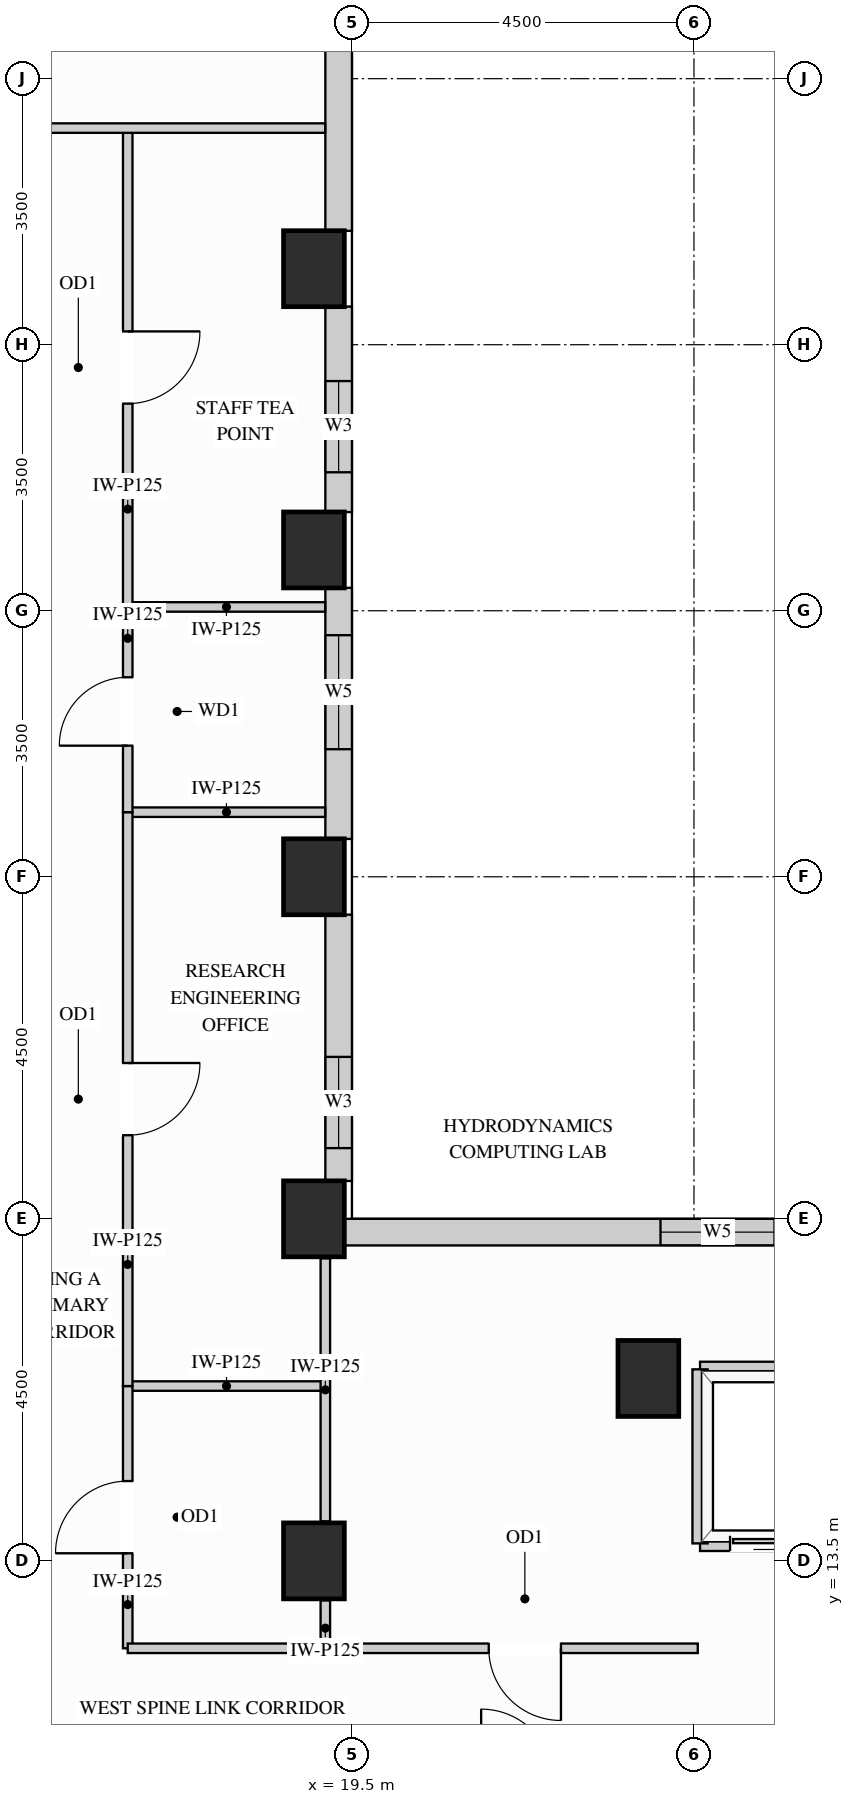
"""IFC4 building model, lengths in metres.
Left out: names, types, materials, properties, quantities, classifications, styles, units other than length and angle.
Written with IfcOpenShell. Run it as: python <this file> out.ifc"""

import sys

from ifc_helpers import new_model, si_unit, direction, frame, frame_2d, origin, origin_2d, place, context, subcontext, project, spatial, rectangle, extrude, source, transform, mapped, element, fill, save


model = new_model("IFC4")
c1 = context("Model", 3, precision=1e-05, world=origin(), true_north=direction((0.0, 1.0)))
c2 = subcontext(c1, "Body", "Model", "MODEL_VIEW")
j1 = project(units=[si_unit("LENGTHUNIT", "METRE"), si_unit("PLANEANGLEUNIT", "RADIAN")], contexts=[c1])
p1 = place(None, origin())
s1 = spatial("IfcSite", under=j1, at=p1, CompositionType="ELEMENT")
p2 = place(p1, origin())
s2 = spatial("IfcBuilding", under=s1, at=p2, CompositionType="ELEMENT")
p3 = place(p2, frame((0.0, 0.0, 186.3)))
s3 = spatial("IfcBuildingStorey", under=s2, at=p3, CompositionType="ELEMENT", Elevation=186.3)
m1 = source(origin(), c2, "Body", "SweptSolid", [
    extrude(rectangle(XDim=0.8, YDim=1.0, at=origin_2d()), origin(), (0.0, 0.0, 1.0), 3.4),
])
for number, where, z_axis, x_axis in (
    (1, (19.0, 13.5, 0.0), (0.0, 0.0, 1.0), (1.0, 0.0, 0.0)),
    (2, (19.0, 18.0, 0.0), (0.0, 0.0, 1.0), (1.0, 0.0, 0.0)),
    (3, (19.0, 22.5, 0.0), (0.0, 0.0, 1.0), (1.0, 0.0, 0.0)),
    (4, (19.0, 26.8, 0.0), (0.0, 0.0, 1.0), (1.0, 0.0, 0.0)),
    (5, (19.0, 30.5, 0.0), (0.0, 0.0, 1.0), (1.0, 0.0, 0.0)),
    (6, (23.4, 15.9, 0.0), (0.0, 0.0, 1.0), (1.0, 0.0, 0.0)),
):
    element("IfcColumn", number, at=place(p3, frame(where, z_axis=z_axis, x_axis=x_axis)), inside=s3, PredefinedType="COLUMN", context=c2, shape_type="MappedRepresentation", body=[
        mapped(m1, transform((0.0, 0.0, 0.0), x_axis=(1.0, 0.0, 0.0), y_axis=(0.0, 1.0, 0.0), z_axis=(0.0, 0.0, 1.0))),
    ])
p4 = place(p3, frame((34.502, 17.825, 0.0), z_axis=(0.0, 0.0, 1.0), x_axis=(-1.0, 0.0, 0.0)))
e7 = element("IfcWall", 7, at=p4, inside=s3, PredefinedType="SOLIDWALL", context=c2, shape_type="SweptSolid", body=[
    extrude(rectangle(XDim=15.104, YDim=0.35, at=frame_2d((7.552, 0.0))), origin(), (0.0, 0.0, 1.0), 3.385),
])
p5 = place(p4, frame((4.131, 0.0, 0.78)))
e8 = element("IfcOpeningElement", 8, at=p5, cuts=e7, PredefinedType="OPENING", context=c2, shape_type="SweptSolid", body=[
    extrude(rectangle(XDim=1.5, YDim=2.0, at=frame_2d((0.75, 1.0))), frame((0.0, 0.185, 0.0), z_axis=(0.0, -1.0, 0.0), x_axis=(1.0, 0.0, 0.0)), (0.0, 0.0, 1.0), 0.37),
])
p6 = place(p4, frame((9.442, 0.0, 0.78)))
e9 = element("IfcOpeningElement", 9, at=p6, cuts=e7, PredefinedType="OPENING", context=c2, shape_type="SweptSolid", body=[
    extrude(rectangle(XDim=1.5, YDim=2.0, at=frame_2d((0.75, 1.0))), frame((0.0, 0.185, 0.0), z_axis=(0.0, -1.0, 0.0), x_axis=(1.0, 0.0, 0.0)), (0.0, 0.0, 1.0), 0.37),
])
p7 = place(p3, frame((19.325, 18.498, 0.0), z_axis=(0.0, 0.0, 1.0), x_axis=(0.0, 1.0, 0.0)))
e10 = element("IfcWall", 10, at=p7, inside=s3, PredefinedType="SOLIDWALL", context=c2, shape_type="SweptSolid", body=[
    extrude(rectangle(XDim=3.504, YDim=0.35, at=frame_2d((1.752, 0.0))), origin(), (0.0, 0.0, 1.0), 2.612),
])
p8 = place(p7, frame((0.433, 0.0, 0.78)))
e11 = element("IfcOpeningElement", 11, at=p8, cuts=e10, PredefinedType="OPENING", context=c2, shape_type="SweptSolid", body=[
    extrude(rectangle(XDim=1.2, YDim=1.652, at=frame_2d((0.6, 0.826))), frame((0.0, 0.185, 0.0), z_axis=(0.0, -1.0, 0.0), x_axis=(1.0, 0.0, 0.0)), (0.0, 0.0, 1.0), 0.37),
])
p9 = place(p3, frame((19.325, 22.998, 0.0), z_axis=(0.0, 0.0, 1.0), x_axis=(0.0, 1.0, 0.0)))
e12 = element("IfcWall", 12, at=p9, inside=s3, PredefinedType="SOLIDWALL", context=c2, shape_type="SweptSolid", body=[
    extrude(rectangle(XDim=3.304, YDim=0.35, at=frame_2d((1.652, 0.0))), origin(), (0.0, 0.0, 1.0), 2.612),
])
p10 = place(p9, frame((1.18, 0.0, 0.78)))
e13 = element("IfcOpeningElement", 13, at=p10, cuts=e12, PredefinedType="OPENING", context=c2, shape_type="SweptSolid", body=[
    extrude(rectangle(XDim=1.5, YDim=1.652, at=frame_2d((0.75, 0.826))), frame((0.0, 0.185, 0.0), z_axis=(0.0, -1.0, 0.0), x_axis=(1.0, 0.0, 0.0)), (0.0, 0.0, 1.0), 0.37),
])
p11 = place(p3, frame((19.325, 27.298, 0.0), z_axis=(0.0, 0.0, 1.0), x_axis=(0.0, 1.0, 0.0)))
e14 = element("IfcWall", 14, at=p11, inside=s3, PredefinedType="SOLIDWALL", context=c2, shape_type="SweptSolid", body=[
    extrude(rectangle(XDim=2.704, YDim=0.35, at=frame_2d((1.352, 0.0))), origin(), (0.0, 0.0, 1.0), 2.612),
])
p12 = place(p11, frame((0.524, 0.0, 0.78)))
e15 = element("IfcOpeningElement", 15, at=p12, cuts=e14, PredefinedType="OPENING", context=c2, shape_type="SweptSolid", body=[
    extrude(rectangle(XDim=1.2, YDim=1.652, at=frame_2d((0.6, 0.826))), frame((0.0, 0.185, 0.0), z_axis=(0.0, -1.0, 0.0), x_axis=(1.0, 0.0, 0.0)), (0.0, 0.0, 1.0), 0.37),
])
m2 = source(origin(), c2, "Body", "SweptSolid", [
    extrude(rectangle(XDim=3.504, YDim=0.35, at=frame_2d((1.752, 0.0))), origin(), (0.0, 0.0, 1.0), 2.612),
])
p13 = place(p3, frame((19.325, 30.998, 0.0), z_axis=(0.0, 0.0, 1.0), x_axis=(0.0, 1.0, 0.0)))
e16 = element("IfcWall", 16, at=p13, inside=s3, PredefinedType="SOLIDWALL", context=c2, shape_type="MappedRepresentation", body=[
    mapped(m2, transform((0.0, 0.0, 0.0), x_axis=(1.0, 0.0, 0.0), y_axis=(0.0, 1.0, 0.0), z_axis=(0.0, 0.0, 1.0))),
])
m3 = source(origin(), c2, "Body", "SweptSolid", [
    extrude(rectangle(XDim=2.6, YDim=0.125, at=frame_2d((1.3, 0.0))), origin(), (0.0, 0.0, 1.0), 3.385),
])
p14 = place(p3, frame((16.55, 15.8, 0.0), z_axis=(0.0, 0.0, 1.0), x_axis=(1.0, 0.0, 0.0)))
e17 = element("IfcWall", 17, at=p14, inside=s3, PredefinedType="PARTITIONING", context=c2, shape_type="MappedRepresentation", body=[
    mapped(m3, transform((0.0, 0.0, 0.0), x_axis=(1.0, 0.0, 0.0), y_axis=(0.0, 1.0, 0.0), z_axis=(0.0, 0.0, 1.0))),
])
m4 = source(origin(), c2, "Body", "SweptSolid", [
    extrude(rectangle(XDim=2.598, YDim=0.125, at=frame_2d((1.299, 0.0))), origin(), (0.0, 0.0, 1.0), 3.385),
])
for number, where, z_axis, x_axis in (
    (18, (16.55, 23.35, 0.0), (0.0, 0.0, 1.0), (1.0, 0.0, 0.0)),
    (19, (16.55, 26.05, 0.0), (0.0, 0.0, 1.0), (1.0, 0.0, 0.0)),
):
    element("IfcWall", number, at=place(p3, frame(where, z_axis=z_axis, x_axis=x_axis)), inside=s3, PredefinedType="PARTITIONING", context=c2, shape_type="MappedRepresentation", body=[
        mapped(m4, transform((0.0, 0.0, 0.0), x_axis=(1.0, 0.0, 0.0), y_axis=(0.0, 1.0, 0.0), z_axis=(0.0, 0.0, 1.0))),
    ])
m5 = source(origin(), c2, "Body", "SweptSolid", [
    extrude(rectangle(XDim=0.63, YDim=0.125, at=frame_2d((0.315, 0.0))), origin(), (0.0, 0.0, 1.0), 2.773),
])
p15 = place(p3, frame((19.15, 12.35, 0.0), z_axis=(0.0, 0.0, 1.0), x_axis=(0.0, 1.0, 0.0)))
e20 = element("IfcWall", 20, at=p15, inside=s3, PredefinedType="PARTITIONING", context=c2, shape_type="MappedRepresentation", body=[
    mapped(m5, transform((0.0, 0.0, 0.0), x_axis=(1.0, 0.0, 0.0), y_axis=(0.0, 1.0, 0.0), z_axis=(0.0, 0.0, 1.0))),
])
m6 = source(origin(), c2, "Body", "SweptSolid", [
    extrude(rectangle(XDim=3.46, YDim=0.125, at=frame_2d((1.73, 0.0))), origin(), (0.0, 0.0, 1.0), 2.773),
])
p16 = place(p3, frame((19.15, 14.02, 0.0), z_axis=(0.0, 0.0, 1.0), x_axis=(0.0, 1.0, 0.0)))
e21 = element("IfcWall", 21, at=p16, inside=s3, PredefinedType="PARTITIONING", context=c2, shape_type="MappedRepresentation", body=[
    mapped(m6, transform((0.0, 0.0, 0.0), x_axis=(1.0, 0.0, 0.0), y_axis=(0.0, 1.0, 0.0), z_axis=(0.0, 0.0, 1.0))),
])
p17 = place(p3, frame((16.55, 12.35, 0.0), z_axis=(0.0, 0.0, 1.0), x_axis=(0.0, 1.0, 0.0)))
e22 = element("IfcWall", 22, at=p17, inside=s3, PredefinedType="PARTITIONING", context=c2, shape_type="SweptSolid", body=[
    extrude(rectangle(XDim=3.45, YDim=0.125, at=frame_2d((1.725, 0.0))), origin(), (0.0, 0.0, 1.0), 3.385),
])
p18 = place(p17, frame((1.25, 0.0, 0.0)))
e23 = element("IfcOpeningElement", 23, at=p18, cuts=e22, PredefinedType="OPENING", context=c2, shape_type="SweptSolid", body=[
    extrude(rectangle(XDim=0.95, YDim=2.15, at=frame_2d((0.475, 1.075))), frame((0.0, 0.073, 0.0), z_axis=(0.0, -1.0, 0.0), x_axis=(1.0, 0.0, 0.0)), (0.0, 0.0, 1.0), 0.145),
])
p19 = place(p3, frame((16.55, 15.8, 0.0), z_axis=(0.0, 0.0, 1.0), x_axis=(0.0, 1.0, 0.0)))
e24 = element("IfcWall", 24, at=p19, inside=s3, PredefinedType="PARTITIONING", context=c2, shape_type="SweptSolid", body=[
    extrude(rectangle(XDim=7.55, YDim=0.125, at=frame_2d((3.775, 0.0))), origin(), (0.0, 0.0, 1.0), 3.385),
])
p20 = place(p19, frame((3.3, 0.0, 0.0)))
e25 = element("IfcOpeningElement", 25, at=p20, cuts=e24, PredefinedType="OPENING", context=c2, shape_type="SweptSolid", body=[
    extrude(rectangle(XDim=0.95, YDim=2.15, at=frame_2d((0.475, 1.075))), frame((0.0, 0.073, 0.0), z_axis=(0.0, -1.0, 0.0), x_axis=(1.0, 0.0, 0.0)), (0.0, 0.0, 1.0), 0.145),
])
p21 = place(p3, frame((16.55, 26.05, 0.0), z_axis=(0.0, 0.0, 1.0), x_axis=(0.0, 1.0, 0.0)))
e26 = element("IfcWall", 26, at=p21, inside=s3, PredefinedType="PARTITIONING", context=c2, shape_type="SweptSolid", body=[
    extrude(rectangle(XDim=6.3, YDim=0.125, at=frame_2d((3.15, 0.0))), origin(), (0.0, 0.0, 1.0), 3.385),
])
p22 = place(p21, frame((2.675, 0.0, 0.0)))
e27 = element("IfcOpeningElement", 27, at=p22, cuts=e26, PredefinedType="OPENING", context=c2, shape_type="SweptSolid", body=[
    extrude(rectangle(XDim=0.95, YDim=2.15, at=frame_2d((0.475, 1.075))), frame((0.0, 0.073, 0.0), z_axis=(0.0, -1.0, 0.0), x_axis=(1.0, 0.0, 0.0)), (0.0, 0.0, 1.0), 0.145),
])
p23 = place(p3, frame((16.55, 23.35, 0.0), z_axis=(0.0, 0.0, 1.0), x_axis=(0.0, 1.0, 0.0)))
e28 = element("IfcWall", 28, at=p23, inside=s3, PredefinedType="PARTITIONING", context=c2, shape_type="SweptSolid", body=[
    extrude(rectangle(XDim=2.7, YDim=0.125, at=frame_2d((1.35, 0.0))), origin(), (0.0, 0.0, 1.0), 3.385),
])
p24 = place(p23, frame((0.875, 0.0, 0.0)))
e29 = element("IfcOpeningElement", 29, at=p24, cuts=e28, PredefinedType="OPENING", context=c2, shape_type="SweptSolid", body=[
    extrude(rectangle(XDim=0.9, YDim=2.15, at=frame_2d((0.45, 1.075))), frame((0.0, 0.073, 0.0), z_axis=(0.0, -1.0, 0.0), x_axis=(1.0, 0.0, 0.0)), (0.0, 0.0, 1.0), 0.145),
])
m7 = source(origin(), c2, "Body", "SweptSolid", [
    extrude(rectangle(XDim=5.798, YDim=0.125, at=frame_2d((2.899, 0.0))), origin(), (0.0, 0.0, 1.0), 3.385),
])
p25 = place(p3, frame((13.35, 32.35, 0.0), z_axis=(0.0, 0.0, 1.0), x_axis=(1.0, 0.0, 0.0)))
e30 = element("IfcWall", 30, at=p25, inside=s3, PredefinedType="PARTITIONING", context=c2, shape_type="MappedRepresentation", body=[
    mapped(m7, transform((0.0, 0.0, 0.0), x_axis=(1.0, 0.0, 0.0), y_axis=(0.0, 1.0, 0.0), z_axis=(0.0, 0.0, 1.0))),
])
m8 = source(origin(), c2, "Body", "SweptSolid", [
    extrude(rectangle(XDim=2.95, YDim=0.125, at=frame_2d((1.475, 0.0))), origin(), (0.0, 0.0, 1.0), 3.385),
])
p26 = place(p3, frame((16.55, 12.35, 0.0), z_axis=(0.0, 0.0, 1.0), x_axis=(1.0, 0.0, 0.0)))
e31 = element("IfcWall", 31, at=p26, inside=s3, PredefinedType="PARTITIONING", context=c2, shape_type="MappedRepresentation", body=[
    mapped(m8, transform((0.0, 0.0, 0.0), x_axis=(1.0, 0.0, 0.0), y_axis=(0.0, 1.0, 0.0), z_axis=(0.0, 0.0, 1.0))),
])
p27 = place(p3, frame((19.5, 12.35, 0.0), z_axis=(0.0, 0.0, 1.0), x_axis=(1.0, 0.0, 0.0)))
e32 = element("IfcWall", 32, at=p27, inside=s3, PredefinedType="PARTITIONING", context=c2, shape_type="SweptSolid", body=[
    extrude(rectangle(XDim=4.55, YDim=0.125, at=frame_2d((2.275, 0.0))), origin(), (0.0, 0.0, 1.0), 3.385),
])
p28 = place(p27, frame((1.8, 0.0, 0.0)))
e33 = element("IfcOpeningElement", 33, at=p28, cuts=e32, PredefinedType="OPENING", context=c2, shape_type="SweptSolid", body=[
    extrude(rectangle(XDim=0.95, YDim=2.15, at=frame_2d((0.475, 1.075))), frame((0.0, 0.073, 0.0), z_axis=(0.0, -1.0, 0.0), x_axis=(1.0, 0.0, 0.0)), (0.0, 0.0, 1.0), 0.145),
])
m9 = source(origin(), c2, "Body", "SweptSolid", [
    extrude(rectangle(XDim=1.89, YDim=0.2, at=frame_2d((0.945, 0.0))), origin(), (0.0, 0.0, 1.0), 2.773),
])
p29 = place(p3, frame((24.08, 16.02, 0.0), z_axis=(0.0, 0.0, 1.0), x_axis=(1.0, 0.0, 0.0)))
e34 = element("IfcWall", 34, at=p29, inside=s3, PredefinedType="PARTITIONING", context=c2, shape_type="MappedRepresentation", body=[
    mapped(m9, transform((0.0, 0.0, 0.0), x_axis=(1.0, 0.0, 0.0), y_axis=(0.0, 1.0, 0.0), z_axis=(0.0, 0.0, 1.0))),
])
p30 = place(p3, frame((24.08, 13.73, 0.0), z_axis=(0.0, 0.0, 1.0), x_axis=(1.0, 0.0, 0.0)))
e35 = element("IfcWall", 35, at=p30, inside=s3, PredefinedType="PARTITIONING", context=c2, shape_type="SweptSolid", body=[
    extrude(rectangle(XDim=1.89, YDim=0.2, at=frame_2d((0.945, 0.0))), origin(), (0.0, 0.0, 1.0), 2.466),
])
p31 = place(p30, frame((0.395, 0.0, 0.0)))
e36 = element("IfcOpeningElement", 36, at=p31, cuts=e35, PredefinedType="OPENING", context=c2, shape_type="SweptSolid", body=[
    extrude(rectangle(XDim=1.1, YDim=2.2, at=frame_2d((0.55, 1.1))), frame((0.0, 0.11, 0.0), z_axis=(0.0, -1.0, 0.0), x_axis=(1.0, 0.0, 0.0)), (0.0, 0.0, 1.0), 0.22),
])
m10 = source(origin(), c2, "Body", "SweptSolid", [
    extrude(rectangle(XDim=2.29, YDim=0.2, at=frame_2d((1.145, 0.0))), origin(), (0.0, 0.0, 1.0), 3.385),
])
p32 = place(p3, frame((24.08, 13.73, 0.0), z_axis=(0.0, 0.0, 1.0), x_axis=(0.0, 1.0, 0.0)))
e37 = element("IfcWall", 37, at=p32, inside=s3, PredefinedType="PARTITIONING", context=c2, shape_type="MappedRepresentation", body=[
    mapped(m10, transform((0.0, 0.0, 0.0), x_axis=(1.0, 0.0, 0.0), y_axis=(0.0, 1.0, 0.0), z_axis=(0.0, 0.0, 1.0))),
])
m11 = source(origin(), c2, "Body", "SweptSolid", [
    extrude(rectangle(XDim=1.1, YDim=2.2, at=frame_2d((0.55, 1.1))), frame((0.0, 0.025, 0.0), z_axis=(0.0, -1.0, 0.0), x_axis=(1.0, 0.0, 0.0)), (0.0, 0.0, 1.0), 0.05),
])
p33 = place(p31, origin())
e38 = element("IfcDoor", 38, at=p33, inside=s3, OperationType="SLIDING_TO_LEFT", PredefinedType="DOOR", context=c2, shape_type="MappedRepresentation", body=[
    mapped(m11, transform((0.0, 0.0, 0.0), x_axis=(1.0, 0.0, 0.0), y_axis=(0.0, 1.0, 0.0), z_axis=(0.0, 0.0, 1.0))),
])
fill(e36, e38)
m12 = source(origin(), c2, "Body", "SweptSolid", [
    extrude(rectangle(XDim=0.95, YDim=2.15, at=frame_2d((0.475, 1.075))), frame((0.0, 0.025, 0.0), z_axis=(0.0, -1.0, 0.0), x_axis=(1.0, 0.0, 0.0)), (0.0, 0.0, 1.0), 0.05),
])
p34 = place(p18, origin())
e39 = element("IfcDoor", 39, at=p34, inside=s3, OperationType="SINGLE_SWING_LEFT", PredefinedType="DOOR", context=c2, shape_type="MappedRepresentation", body=[
    mapped(m12, transform((0.0, 0.0, 0.0), x_axis=(1.0, 0.0, 0.0), y_axis=(0.0, 1.0, 0.0), z_axis=(0.0, 0.0, 1.0))),
])
fill(e23, e39)
p35 = place(p20, origin())
e40 = element("IfcDoor", 40, at=p35, inside=s3, OperationType="SINGLE_SWING_RIGHT", PredefinedType="DOOR", context=c2, shape_type="MappedRepresentation", body=[
    mapped(m12, transform((0.0, 0.0, 0.0), x_axis=(1.0, 0.0, 0.0), y_axis=(0.0, 1.0, 0.0), z_axis=(0.0, 0.0, 1.0))),
])
fill(e25, e40)
p36 = place(p22, origin())
e41 = element("IfcDoor", 41, at=p36, inside=s3, OperationType="SINGLE_SWING_RIGHT", PredefinedType="DOOR", context=c2, shape_type="MappedRepresentation", body=[
    mapped(m12, transform((0.0, 0.0, 0.0), x_axis=(1.0, 0.0, 0.0), y_axis=(0.0, 1.0, 0.0), z_axis=(0.0, 0.0, 1.0))),
])
fill(e27, e41)
p37 = place(p28, origin())
e42 = element("IfcDoor", 42, at=p37, inside=s3, OperationType="SINGLE_SWING_RIGHT", PredefinedType="DOOR", context=c2, shape_type="MappedRepresentation", body=[
    mapped(m12, transform((0.0, 0.0, 0.0), x_axis=(1.0, 0.0, 0.0), y_axis=(0.0, 1.0, 0.0), z_axis=(0.0, 0.0, 1.0))),
])
fill(e33, e42)
m13 = source(origin(), c2, "Body", "SweptSolid", [
    extrude(rectangle(XDim=0.9, YDim=2.15, at=frame_2d((0.45, 1.075))), frame((0.0, 0.025, 0.0), z_axis=(0.0, -1.0, 0.0), x_axis=(1.0, 0.0, 0.0)), (0.0, 0.0, 1.0), 0.05),
])
p38 = place(p24, origin())
e43 = element("IfcDoor", 43, at=p38, inside=s3, OperationType="SINGLE_SWING_LEFT", PredefinedType="DOOR", context=c2, shape_type="MappedRepresentation", body=[
    mapped(m13, transform((0.0, 0.0, 0.0), x_axis=(1.0, 0.0, 0.0), y_axis=(0.0, 1.0, 0.0), z_axis=(0.0, 0.0, 1.0))),
])
fill(e29, e43)
m14 = source(origin(), c2, "Body", "SweptSolid", [
    extrude(rectangle(XDim=1.2, YDim=1.652, at=frame_2d((0.6, 0.826))), frame((0.0, 0.03, 0.0), z_axis=(0.0, -1.0, 0.0), x_axis=(1.0, 0.0, 0.0)), (0.0, 0.0, 1.0), 0.06),
])
p39 = place(p8, origin())
e44 = element("IfcWindow", 44, at=p39, inside=s3, PartitioningType="SINGLE_PANEL", PredefinedType="WINDOW", context=c2, shape_type="MappedRepresentation", body=[
    mapped(m14, transform((0.0, 0.0, 0.0), x_axis=(1.0, 0.0, 0.0), y_axis=(0.0, 1.0, 0.0), z_axis=(0.0, 0.0, 1.0))),
])
fill(e11, e44)
p40 = place(p12, origin())
e45 = element("IfcWindow", 45, at=p40, inside=s3, PartitioningType="SINGLE_PANEL", PredefinedType="WINDOW", context=c2, shape_type="MappedRepresentation", body=[
    mapped(m14, transform((0.0, 0.0, 0.0), x_axis=(1.0, 0.0, 0.0), y_axis=(0.0, 1.0, 0.0), z_axis=(0.0, 0.0, 1.0))),
])
fill(e15, e45)
m15 = source(origin(), c2, "Body", "SweptSolid", [
    extrude(rectangle(XDim=1.5, YDim=2.0, at=frame_2d((0.75, 1.0))), frame((0.0, 0.03, 0.0), z_axis=(0.0, -1.0, 0.0), x_axis=(1.0, 0.0, 0.0)), (0.0, 0.0, 1.0), 0.06),
])
p41 = place(p6, origin())
e46 = element("IfcWindow", 46, at=p41, inside=s3, PartitioningType="SINGLE_PANEL", PredefinedType="WINDOW", context=c2, shape_type="MappedRepresentation", body=[
    mapped(m15, transform((0.0, 0.0, 0.0), x_axis=(1.0, 0.0, 0.0), y_axis=(0.0, 1.0, 0.0), z_axis=(0.0, 0.0, 1.0))),
])
fill(e9, e46)
m16 = source(origin(), c2, "Body", "SweptSolid", [
    extrude(rectangle(XDim=1.5, YDim=1.652, at=frame_2d((0.75, 0.826))), frame((0.0, 0.03, 0.0), z_axis=(0.0, -1.0, 0.0), x_axis=(1.0, 0.0, 0.0)), (0.0, 0.0, 1.0), 0.06),
])
p42 = place(p10, origin())
e47 = element("IfcWindow", 47, at=p42, inside=s3, PartitioningType="SINGLE_PANEL", PredefinedType="WINDOW", context=c2, shape_type="MappedRepresentation", body=[
    mapped(m16, transform((0.0, 0.0, 0.0), x_axis=(1.0, 0.0, 0.0), y_axis=(0.0, 1.0, 0.0), z_axis=(0.0, 0.0, 1.0))),
])
fill(e13, e47)
save(model, sys.argv[1])
